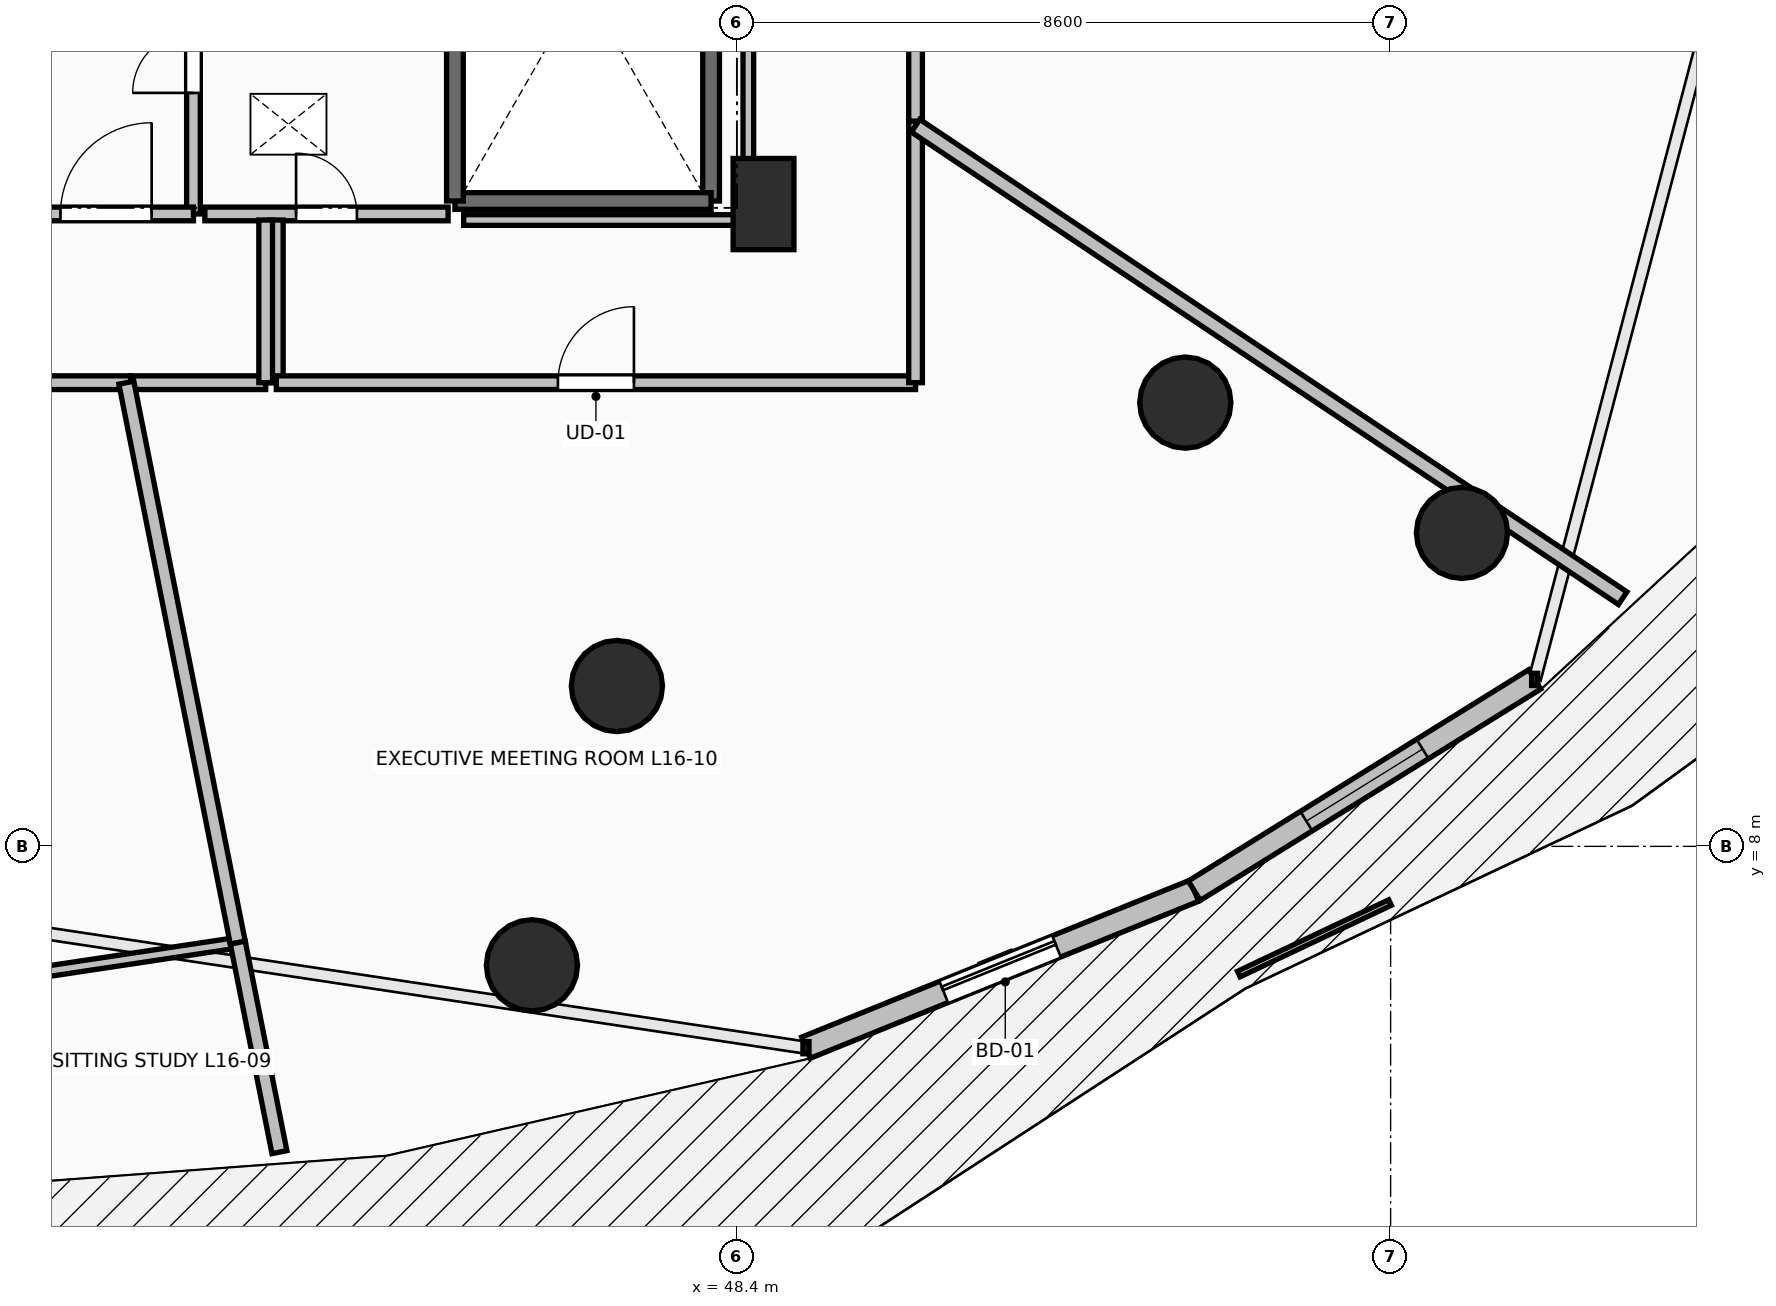
"""IFC4 building model, lengths in metres.
Left out: names, types, materials, properties, quantities, classifications, styles, units other than length and angle.
Written with IfcOpenShell. Run it as: python <this file> out.ifc"""

import sys

from ifc_helpers import new_model, si_unit, direction, frame, frame_2d, origin, origin_2d, place, context, subcontext, project, spatial, rectangle, circle, extrude, element, fill, save


model = new_model("IFC4")
c1 = context("Model", 3, precision=1e-05, world=origin(), true_north=direction((0.0, 1.0)))
c2 = subcontext(c1, "Body", "Model", "MODEL_VIEW")
j1 = project(units=[si_unit("LENGTHUNIT", "METRE"), si_unit("PLANEANGLEUNIT", "RADIAN")], contexts=[c1])
p1 = place(None, origin())
s1 = spatial("IfcSite", under=j1, at=p1, CompositionType="ELEMENT")
p2 = place(p1, origin())
s2 = spatial("IfcBuilding", under=s1, at=p2, CompositionType="ELEMENT")
p3 = place(p2, frame((0.0, 0.0, 62.5)))
s3 = spatial("IfcBuildingStorey", under=s2, at=p3, CompositionType="ELEMENT", Elevation=62.5)
for number, where, z_axis, x_axis in (
    (1, (46.821, 10.109, 0.0), (0.0, 0.0, 1.0), (0.383, -0.924, 0.0)),
    (2, (54.299, 13.838, 0.0), (0.0, 0.0, 1.0), (0.707, -0.707, 0.0)),
    (3, (45.703, 6.435, 0.0), (0.0, 0.0, 1.0), (0.383, -0.924, 0.0)),
    (4, (57.939, 12.124, 0.0), (0.0, 0.0, 1.0), (0.707, -0.707, 0.0)),
):
    element("IfcColumn", number, at=place(p3, frame(where, z_axis=z_axis, x_axis=x_axis)), inside=s3, PredefinedType="COLUMN", context=c2, shape_type="SweptSolid", body=[
        extrude(circle(Radius=0.6, at=origin_2d()), origin(), (0.0, 0.0, 1.0), 3.5),
    ])
p4 = place(p3, frame((48.75, 16.45, 0.0), z_axis=(0.0, 0.0, 1.0), x_axis=(1.0, 0.0, 0.0)))
e5 = element("IfcColumn", 5, at=p4, inside=s3, PredefinedType="PILASTER", context=c2, shape_type="SweptSolid", body=[
    extrude(rectangle(XDim=0.8, YDim=1.2, at=origin_2d()), origin(), (0.0, 0.0, 1.0), 3.5),
])
p5 = place(p3, frame((49.308, 5.351, 0.0), z_axis=(0.0, 0.0, 1.0), x_axis=(0.927095325176, 0.374825636845, 0.0)))
e6 = element("IfcWall", 6, at=p5, inside=s3, PredefinedType="STANDARD", context=c2, shape_type="SweptSolid", body=[
    extrude(rectangle(XDim=5.51, YDim=0.3, at=frame_2d((2.755, 0.0))), origin(), (0.0, 0.0, 1.0), 3.24),
])
p6 = place(p5, frame((1.955, 0.0, 0.0)))
e7 = element("IfcOpeningElement", 7, at=p6, cuts=e6, PredefinedType="OPENING", context=c2, shape_type="SweptSolid", body=[
    extrude(rectangle(XDim=1.6, YDim=2.3, at=frame_2d((0.8, 1.15))), frame((0.0, 0.165, 0.0), z_axis=(0.0, -1.0, 0.0), x_axis=(1.0, 0.0, 0.0)), (0.0, 0.0, 1.0), 0.33),
])
p7 = place(p3, frame((54.417, 7.417, 0.0), z_axis=(0.0, 0.0, 1.0), x_axis=(0.849633724826, 0.527373239404, 0.0)))
e8 = element("IfcWall", 8, at=p7, inside=s3, PredefinedType="STANDARD", context=c2, shape_type="SweptSolid", body=[
    extrude(rectangle(XDim=5.271, YDim=0.3, at=frame_2d((2.635, 0.0))), origin(), (0.0, 0.0, 1.0), 3.24),
])
p8 = place(p7, frame((1.735, 0.0, 0.85)))
e9 = element("IfcOpeningElement", 9, at=p8, cuts=e8, PredefinedType="OPENING", context=c2, shape_type="SweptSolid", body=[
    extrude(rectangle(XDim=1.8, YDim=2.19, at=frame_2d((0.9, 1.095))), frame((0.0, 0.165, 0.0), z_axis=(0.0, -1.0, 0.0), x_axis=(1.0, 0.0, 0.0)), (0.0, 0.0, 1.0), 0.33),
])
p9 = place(p3, frame((48.06, 23.91, 0.0), z_axis=(0.0, 0.0, 1.0), x_axis=(0.0, -1.0, 0.0)))
e10 = element("IfcWall", 10, at=p9, inside=s3, PredefinedType="SOLIDWALL", context=c2, shape_type="SweptSolid", body=[
    extrude(rectangle(XDim=7.42, YDim=0.22, at=frame_2d((3.71, 0.0))), origin(), (0.0, 0.0, 1.0), 3.24),
])
p10 = place(p3, frame((48.06, 16.49, 0.0), z_axis=(0.0, 0.0, 1.0), x_axis=(-1.0, 0.0, 0.0)))
e11 = element("IfcWall", 11, at=p10, inside=s3, PredefinedType="SOLIDWALL", context=c2, shape_type="SweptSolid", body=[
    extrude(rectangle(XDim=3.37, YDim=0.22, at=frame_2d((1.685, 0.0))), origin(), (0.0, 0.0, 1.0), 3.24),
])
p11 = place(p3, frame((44.69, 16.49, 0.0), z_axis=(0.0, 0.0, 1.0), x_axis=(0.0, 1.0, 0.0)))
e12 = element("IfcWall", 12, at=p11, inside=s3, PredefinedType="SOLIDWALL", context=c2, shape_type="SweptSolid", body=[
    extrude(rectangle(XDim=7.42, YDim=0.22, at=frame_2d((3.71, 0.0))), origin(), (0.0, 0.0, 1.0), 3.24),
])
p12 = place(p3, frame((41.25, 16.32, 0.0), z_axis=(0.0, 0.0, 1.0), x_axis=(0.0, 1.0, 0.0)))
e13 = element("IfcWall", 13, at=p12, inside=s3, PredefinedType="PARTITIONING", context=c2, shape_type="SweptSolid", body=[
    extrude(rectangle(XDim=3.985, YDim=0.18, at=frame_2d((1.992, 0.0))), origin(), (0.0, 0.0, 1.0), 3.24),
])
p13 = place(p12, frame((1.593, 0.0, 0.0)))
e14 = element("IfcOpeningElement", 14, at=p13, cuts=e13, PredefinedType="OPENING", context=c2, shape_type="SweptSolid", body=[
    extrude(rectangle(XDim=0.8, YDim=2.05, at=frame_2d((0.4, 1.025))), frame((0.0, 0.105, 0.0), z_axis=(0.0, -1.0, 0.0), x_axis=(1.0, 0.0, 0.0)), (0.0, 0.0, 1.0), 0.21),
])
p14 = place(p3, frame((38.95, 16.32, 0.0), z_axis=(0.0, 0.0, 1.0), x_axis=(1.0, 0.0, 0.0)))
e15 = element("IfcWall", 15, at=p14, inside=s3, PredefinedType="PARTITIONING", context=c2, shape_type="SweptSolid", body=[
    extrude(rectangle(XDim=2.3, YDim=0.18, at=frame_2d((1.15, 0.0))), origin(), (0.0, 0.0, 1.0), 3.24),
])
p15 = place(p14, frame((0.55, 0.0, 0.0)))
e16 = element("IfcOpeningElement", 16, at=p15, cuts=e15, PredefinedType="OPENING", context=c2, shape_type="SweptSolid", body=[
    extrude(rectangle(XDim=1.2, YDim=2.15, at=frame_2d((0.6, 1.075))), frame((0.0, 0.105, 0.0), z_axis=(0.0, -1.0, 0.0), x_axis=(1.0, 0.0, 0.0)), (0.0, 0.0, 1.0), 0.21),
])
p16 = place(p3, frame((41.4, 16.32, 0.0), z_axis=(0.0, 0.0, 1.0), x_axis=(1.0, 0.0, 0.0)))
e17 = element("IfcWall", 17, at=p16, inside=s3, PredefinedType="PARTITIONING", context=c2, shape_type="SweptSolid", body=[
    extrude(rectangle(XDim=3.2, YDim=0.18, at=frame_2d((1.6, 0.0))), origin(), (0.0, 0.0, 1.0), 3.24),
])
p17 = place(p16, frame((1.2, 0.0, 0.0)))
e18 = element("IfcOpeningElement", 18, at=p17, cuts=e17, PredefinedType="OPENING", context=c2, shape_type="SweptSolid", body=[
    extrude(rectangle(XDim=0.8, YDim=2.05, at=frame_2d((0.4, 1.025))), frame((0.0, 0.105, 0.0), z_axis=(0.0, -1.0, 0.0), x_axis=(1.0, 0.0, 0.0)), (0.0, 0.0, 1.0), 0.21),
])
p18 = place(p3, frame((34.982, 14.1, 0.0), z_axis=(0.0, 0.0, 1.0), x_axis=(1.0, 0.0, 0.0)))
e19 = element("IfcWall", 19, at=p18, inside=s3, PredefinedType="PARTITIONING", context=c2, shape_type="SweptSolid", body=[
    extrude(rectangle(XDim=5.446, YDim=0.18, at=frame_2d((2.723, 0.0))), origin(), (0.0, 0.0, 1.0), 3.24),
])
p19 = place(p18, frame((2.198, 0.0, 0.0)))
e20 = element("IfcOpeningElement", 20, at=p19, cuts=e19, PredefinedType="OPENING", context=c2, shape_type="SweptSolid", body=[
    extrude(rectangle(XDim=1.05, YDim=2.2, at=frame_2d((0.525, 1.1))), frame((0.0, 0.105, 0.0), z_axis=(0.0, -1.0, 0.0), x_axis=(1.0, 0.0, 0.0)), (0.0, 0.0, 1.0), 0.21),
])
p20 = place(p3, frame((42.34, 16.24, 0.0), z_axis=(0.0, 0.0, 1.0), x_axis=(0.0, -1.0, 0.0)))
e21 = element("IfcWall", 21, at=p20, inside=s3, PredefinedType="PARTITIONING", context=c2, shape_type="SweptSolid", body=[
    extrude(rectangle(XDim=2.14, YDim=0.18, at=frame_2d((1.07, 0.0))), origin(), (0.0, 0.0, 1.0), 3.24),
])
p21 = place(p3, frame((42.34, 14.1, 0.0), z_axis=(0.0, 0.0, 1.0), x_axis=(1.0, 0.0, 0.0)))
e22 = element("IfcWall", 22, at=p21, inside=s3, PredefinedType="PARTITIONING", context=c2, shape_type="SweptSolid", body=[
    extrude(rectangle(XDim=8.41, YDim=0.18, at=frame_2d((4.205, 0.0))), origin(), (0.0, 0.0, 1.0), 2.432),
])
p22 = place(p21, frame((3.705, 0.0, 0.0)))
e23 = element("IfcOpeningElement", 23, at=p22, cuts=e22, PredefinedType="OPENING", context=c2, shape_type="SweptSolid", body=[
    extrude(rectangle(XDim=1.0, YDim=2.15, at=frame_2d((0.5, 1.075))), frame((0.0, 0.105, 0.0), z_axis=(0.0, -1.0, 0.0), x_axis=(1.0, 0.0, 0.0)), (0.0, 0.0, 1.0), 0.21),
])
p23 = place(p3, frame((50.75, 14.1, 0.0), z_axis=(0.0, 0.0, 1.0), x_axis=(0.0, 1.0, 0.0)))
e24 = element("IfcWall", 24, at=p23, inside=s3, PredefinedType="PARTITIONING", context=c2, shape_type="SweptSolid", body=[
    extrude(rectangle(XDim=3.441, YDim=0.18, at=frame_2d((1.72, 0.0))), origin(), (0.0, 0.0, 1.0), 2.432),
])
p24 = place(p3, frame((40.428, 14.1, 0.0), z_axis=(0.0, 0.0, 1.0), x_axis=(1.0, 0.0, 0.0)))
e25 = element("IfcWall", 25, at=p24, inside=s3, PredefinedType="PARTITIONING", context=c2, shape_type="SweptSolid", body=[
    extrude(rectangle(XDim=1.772, YDim=0.18, at=frame_2d((0.886, 0.0))), origin(), (0.0, 0.0, 1.0), 3.24),
])
p25 = place(p3, frame((42.2, 14.1, 0.0), z_axis=(0.0, 0.0, 1.0), x_axis=(0.0, 1.0, 0.0)))
e26 = element("IfcWall", 26, at=p25, inside=s3, PredefinedType="PARTITIONING", context=c2, shape_type="SweptSolid", body=[
    extrude(rectangle(XDim=2.14, YDim=0.18, at=frame_2d((1.07, 0.0))), origin(), (0.0, 0.0, 1.0), 3.24),
])
p26 = place(p3, frame((50.75, 17.541, 0.0), z_axis=(0.0, 0.0, 1.0), x_axis=(0.0, 1.0, 0.0)))
e27 = element("IfcWall", 27, at=p26, inside=s3, PredefinedType="PARTITIONING", context=c2, shape_type="SweptSolid", body=[
    extrude(rectangle(XDim=10.795, YDim=0.18, at=frame_2d((5.397, 0.0))), origin(), (0.0, 0.0, 1.0), 2.432),
])
p27 = place(p26, frame((4.897, 0.0, 0.0)))
e28 = element("IfcOpeningElement", 28, at=p27, cuts=e27, PredefinedType="OPENING", context=c2, shape_type="SweptSolid", body=[
    extrude(rectangle(XDim=1.0, YDim=2.15, at=frame_2d((0.5, 1.075))), frame((0.0, 0.105, 0.0), z_axis=(0.0, -1.0, 0.0), x_axis=(1.0, 0.0, 0.0)), (0.0, 0.0, 1.0), 0.21),
])
p28 = place(p3, frame((38.0, 6.156, 0.0), z_axis=(0.0, 0.0, 1.0), x_axis=(0.988862311426, 0.148833225599, 0.0)))
e29 = element("IfcWall", 29, at=p28, inside=s3, PredefinedType="PARTITIONING", context=c2, shape_type="SweptSolid", body=[
    extrude(rectangle(XDim=3.876, YDim=0.14, at=frame_2d((1.938, 0.0))), origin(), (0.0, 0.0, 1.0), 2.624),
])
p29 = place(p3, frame((41.833, 6.733, 0.0), z_axis=(0.0, 0.0, 1.0), x_axis=(-0.195172247164, 0.980768980921, 0.0)))
e30 = element("IfcWall", 30, at=p29, inside=s3, PredefinedType="PARTITIONING", context=c2, shape_type="SweptSolid", body=[
    extrude(rectangle(XDim=7.512, YDim=0.2, at=frame_2d((3.756, 0.0))), origin(), (0.0, 0.0, 1.0), 2.432),
])
p30 = place(p3, frame((42.381, 3.977, 0.0), z_axis=(0.0, 0.0, 1.0), x_axis=(-0.195063341769, 0.980790646722, 0.0)))
e31 = element("IfcWall", 31, at=p30, inside=s3, PredefinedType="PARTITIONING", context=c2, shape_type="SweptSolid", body=[
    extrude(rectangle(XDim=2.81, YDim=0.2, at=frame_2d((1.405, 0.0))), origin(), (0.0, 0.0, 1.0), 2.624),
])
p31 = place(p3, frame((60.053, 11.265, 0.0), z_axis=(0.0, 0.0, 1.0), x_axis=(-0.831469078055, 0.555571032577, 0.0)))
e32 = element("IfcWall", 32, at=p31, inside=s3, PredefinedType="PARTITIONING", context=c2, shape_type="SweptSolid", body=[
    extrude(rectangle(XDim=11.189, YDim=0.2, at=frame_2d((5.594, 0.0))), origin(), (0.0, 0.0, 1.0), 2.624),
])
p32 = place(p3, frame((48.55, 23.754, 0.0), z_axis=(0.0, 0.0, 1.0), x_axis=(0.0, -1.0, 0.0)))
e33 = element("IfcWall", 33, at=p32, inside=s3, PredefinedType="PARTITIONING", context=c2, shape_type="SweptSolid", body=[
    extrude(rectangle(XDim=7.514, YDim=0.14, at=frame_2d((3.757, 0.0))), origin(), (0.0, 0.0, 1.0), 2.432),
])
p33 = place(p3, frame((48.55, 16.24, 0.0), z_axis=(0.0, 0.0, 1.0), x_axis=(-1.0, 0.0, 0.0)))
e34 = element("IfcWall", 34, at=p33, inside=s3, PredefinedType="PARTITIONING", context=c2, shape_type="SweptSolid", body=[
    extrude(rectangle(XDim=3.745, YDim=0.14, at=frame_2d((1.873, 0.0))), origin(), (0.0, 0.0, 1.0), 2.432),
])
p34 = place(p6, origin())
e35 = element("IfcDoor", 35, at=p34, inside=s3, OperationType="SLIDING_TO_LEFT", PredefinedType="DOOR", context=c2, shape_type="SweptSolid", body=[
    extrude(rectangle(XDim=1.6, YDim=2.3, at=frame_2d((0.8, 1.15))), frame((0.0, 0.025, 0.0), z_axis=(0.0, -1.0, 0.0), x_axis=(1.0, 0.0, 0.0)), (0.0, 0.0, 1.0), 0.05),
])
fill(e7, e35)
p35 = place(p8, origin())
e36 = element("IfcWindow", 36, at=p35, inside=s3, PartitioningType="SINGLE_PANEL", PredefinedType="WINDOW", context=c2, shape_type="SweptSolid", body=[
    extrude(rectangle(XDim=1.8, YDim=2.19, at=frame_2d((0.9, 1.095))), frame((0.0, 0.03, 0.0), z_axis=(0.0, -1.0, 0.0), x_axis=(1.0, 0.0, 0.0)), (0.0, 0.0, 1.0), 0.06),
])
fill(e9, e36)
p36 = place(p13, origin())
e37 = element("IfcDoor", 37, at=p36, inside=s3, OperationType="SINGLE_SWING_LEFT", PredefinedType="DOOR", context=c2, shape_type="SweptSolid", body=[
    extrude(rectangle(XDim=0.8, YDim=2.05, at=frame_2d((0.4, 1.025))), frame((0.0, 0.025, 0.0), z_axis=(0.0, -1.0, 0.0), x_axis=(1.0, 0.0, 0.0)), (0.0, 0.0, 1.0), 0.05),
])
fill(e14, e37)
p37 = place(p15, origin())
e38 = element("IfcDoor", 38, at=p37, inside=s3, OperationType="SINGLE_SWING_RIGHT", PredefinedType="DOOR", context=c2, shape_type="SweptSolid", body=[
    extrude(rectangle(XDim=1.2, YDim=2.15, at=frame_2d((0.6, 1.075))), frame((0.0, 0.025, 0.0), z_axis=(0.0, -1.0, 0.0), x_axis=(1.0, 0.0, 0.0)), (0.0, 0.0, 1.0), 0.05),
])
fill(e16, e38)
p38 = place(p17, origin())
e39 = element("IfcDoor", 39, at=p38, inside=s3, OperationType="SINGLE_SWING_LEFT", PredefinedType="DOOR", context=c2, shape_type="SweptSolid", body=[
    extrude(rectangle(XDim=0.8, YDim=2.05, at=frame_2d((0.4, 1.025))), frame((0.0, 0.025, 0.0), z_axis=(0.0, -1.0, 0.0), x_axis=(1.0, 0.0, 0.0)), (0.0, 0.0, 1.0), 0.05),
])
fill(e18, e39)
p39 = place(p22, origin())
e40 = element("IfcDoor", 40, at=p39, inside=s3, OperationType="SINGLE_SWING_RIGHT", PredefinedType="DOOR", context=c2, shape_type="SweptSolid", body=[
    extrude(rectangle(XDim=1.0, YDim=2.15, at=frame_2d((0.5, 1.075))), frame((0.0, 0.025, 0.0), z_axis=(0.0, -1.0, 0.0), x_axis=(1.0, 0.0, 0.0)), (0.0, 0.0, 1.0), 0.05),
])
fill(e23, e40)
save(model, sys.argv[1])
